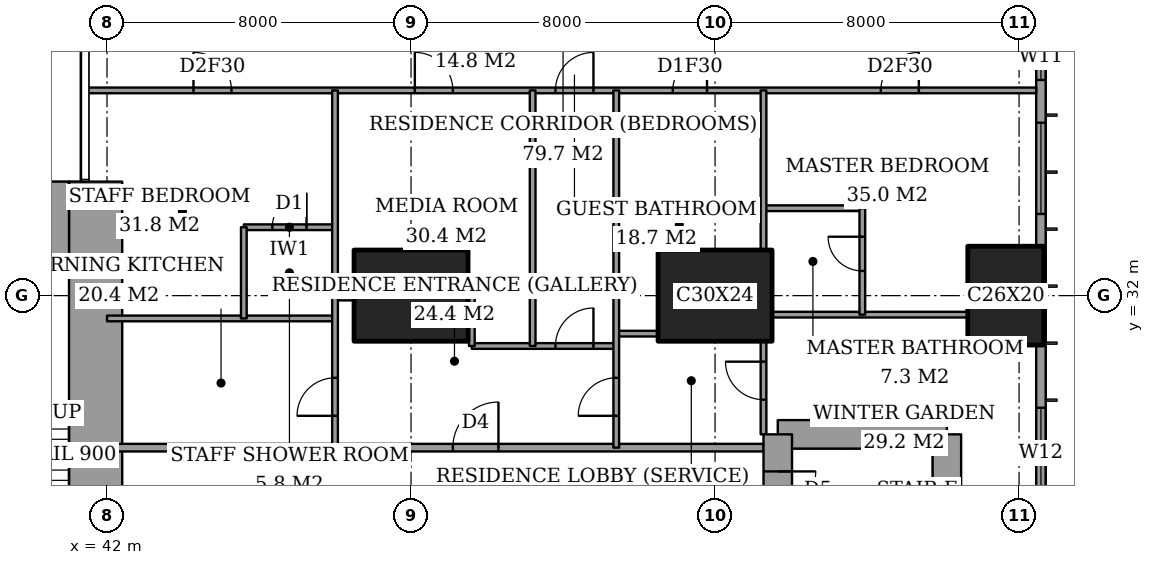
"""IFC4 building model, lengths in metres.
Left out: names, types, materials, properties, quantities, classifications, styles, units other than length and angle.
Written with IfcOpenShell. Run it as: python <this file> out.ifc"""

import sys

from ifc_helpers import new_model, si_unit, direction, frame, frame_2d, origin, origin_2d, place, context, subcontext, project, spatial, rectangle, extrude, element, fill, save


model = new_model("IFC4")
c1 = context("Model", 3, precision=1e-05, world=origin(), true_north=direction((0.0, 1.0)))
c2 = subcontext(c1, "Body", "Model", "MODEL_VIEW")
j1 = project(units=[si_unit("LENGTHUNIT", "METRE"), si_unit("PLANEANGLEUNIT", "RADIAN")], contexts=[c1])
p1 = place(None, origin())
s1 = spatial("IfcSite", under=j1, at=p1, CompositionType="ELEMENT")
p2 = place(p1, origin())
s2 = spatial("IfcBuilding", under=s1, at=p2, CompositionType="ELEMENT")
p3 = place(p2, frame((0.0, 0.0, 168.2)))
s3 = spatial("IfcBuildingStorey", under=s2, at=p3, CompositionType="ELEMENT", Elevation=168.2)
for number, where, z_axis, x_axis in (
    (1, (50.0, 32.0, 0.0), (0.0, 0.0, 1.0), (1.0, 0.0, 0.0)),
    (2, (58.0, 32.0, 0.0), (0.0, 0.0, 1.0), (1.0, 0.0, 0.0)),
):
    element("IfcColumn", number, at=place(p3, frame(where, z_axis=z_axis, x_axis=x_axis)), inside=s3, PredefinedType="COLUMN", context=c2, shape_type="SweptSolid", body=[
        extrude(rectangle(XDim=3.0, YDim=2.4, at=origin_2d()), origin(), (0.0, 0.0, 1.0), 3.6),
    ])
p4 = place(p3, frame((65.65, 32.0, 0.0), z_axis=(0.0, 0.0, 1.0), x_axis=(0.0, 1.0, 0.0)))
e3 = element("IfcColumn", 3, at=p4, inside=s3, PredefinedType="COLUMN", context=c2, shape_type="SweptSolid", body=[
    extrude(rectangle(XDim=2.6, YDim=2.0, at=origin_2d()), origin(), (0.0, 0.0, 1.0), 3.6),
])
p5 = place(p3, frame((37.85, 34.0, 0.0), z_axis=(0.0, 0.0, 1.0), x_axis=(1.0, 0.0, 0.0)))
e4 = element("IfcWall", 4, at=p5, inside=s3, PredefinedType="SHEAR", context=c2, shape_type="SweptSolid", body=[
    extrude(rectangle(XDim=3.15, YDim=2.0, at=frame_2d((1.575, 0.0))), origin(), (0.0, 0.0, 1.0), 3.6),
])
p6 = place(p3, frame((41.7, 24.85, 0.0), z_axis=(0.0, 0.0, 1.0), x_axis=(0.0, 1.0, 0.0)))
e5 = element("IfcWall", 5, at=p6, inside=s3, PredefinedType="SHEAR", context=c2, shape_type="SweptSolid", body=[
    extrude(rectangle(XDim=10.15, YDim=1.4, at=frame_2d((5.075, 0.0))), origin(), (0.0, 0.0, 1.0), 3.6),
])
p7 = place(p3, frame((64.1, 19.65, 0.0), z_axis=(0.0, 0.0, 1.0), x_axis=(0.0, 1.0, 0.0)))
e6 = element("IfcWall", 6, at=p7, inside=s3, PredefinedType="SHEAR", context=c2, shape_type="SweptSolid", body=[
    extrude(rectangle(XDim=8.7, YDim=0.75, at=frame_2d((4.35, 0.0))), origin(), (0.0, 0.0, 1.0), 3.6),
])
p8 = place(p3, frame((64.1, 28.35, 0.0), z_axis=(0.0, 0.0, 1.0), x_axis=(-1.0, 0.0, 0.0)))
e7 = element("IfcWall", 7, at=p8, inside=s3, PredefinedType="SHEAR", context=c2, shape_type="SweptSolid", body=[
    extrude(rectangle(XDim=4.45, YDim=0.75, at=frame_2d((2.225, 0.0))), origin(), (0.0, 0.0, 1.0), 3.6),
])
p9 = place(p3, frame((59.65, 28.35, 0.0), z_axis=(0.0, 0.0, 1.0), x_axis=(0.0, -1.0, 0.0)))
e8 = element("IfcWall", 8, at=p9, inside=s3, PredefinedType="SHEAR", context=c2, shape_type="SweptSolid", body=[
    extrude(rectangle(XDim=8.7, YDim=0.75, at=frame_2d((4.35, 0.0))), origin(), (0.0, 0.0, 1.0), 3.6),
])
p10 = place(p9, frame((0.975, 0.0, 0.0)))
e9 = element("IfcOpeningElement", 9, at=p10, cuts=e8, PredefinedType="OPENING", context=c2, shape_type="SweptSolid", body=[
    extrude(rectangle(XDim=1.0, YDim=2.1, at=frame_2d((0.5, 1.05))), frame((0.0, 0.385, 0.0), z_axis=(0.0, -1.0, 0.0), x_axis=(1.0, 0.0, 0.0)), (0.0, 0.0, 1.0), 0.77),
])
p11 = place(p3, frame((66.575, 3.175, 0.0), z_axis=(0.0, 0.0, 1.0), x_axis=(0.0, 1.0, 0.0)))
e10 = element("IfcWall", 10, at=p11, inside=s3, PredefinedType="SOLIDWALL", context=c2, shape_type="SweptSolid", body=[
    extrude(rectangle(XDim=41.65, YDim=0.25, at=frame_2d((20.825, 0.0))), origin(), (0.0, 0.0, 1.0), 3.6),
])
p12 = place(p11, frame((0.775, 0.0, 0.4)))
e11 = element("IfcOpeningElement", 11, at=p12, cuts=e10, PredefinedType="OPENING", context=c2, shape_type="SweptSolid", body=[
    extrude(rectangle(XDim=2.4, YDim=2.2, at=frame_2d((1.2, 1.1))), frame((0.0, 0.135, 0.0), z_axis=(0.0, -1.0, 0.0), x_axis=(1.0, 0.0, 0.0)), (0.0, 0.0, 1.0), 0.27),
])
p13 = place(p11, frame((6.225, 0.0, 0.4)))
e12 = element("IfcOpeningElement", 12, at=p13, cuts=e10, PredefinedType="OPENING", context=c2, shape_type="SweptSolid", body=[
    extrude(rectangle(XDim=1.2, YDim=2.2, at=frame_2d((0.6, 1.1))), frame((0.0, 0.135, 0.0), z_axis=(0.0, -1.0, 0.0), x_axis=(1.0, 0.0, 0.0)), (0.0, 0.0, 1.0), 0.27),
])
p14 = place(p11, frame((8.475, 0.0, 0.4)))
e13 = element("IfcOpeningElement", 13, at=p14, cuts=e10, PredefinedType="OPENING", context=c2, shape_type="SweptSolid", body=[
    extrude(rectangle(XDim=2.4, YDim=2.2, at=frame_2d((1.2, 1.1))), frame((0.0, 0.135, 0.0), z_axis=(0.0, -1.0, 0.0), x_axis=(1.0, 0.0, 0.0)), (0.0, 0.0, 1.0), 0.27),
])
p15 = place(p11, frame((15.775, 0.0, 0.4)))
e14 = element("IfcOpeningElement", 14, at=p15, cuts=e10, PredefinedType="OPENING", context=c2, shape_type="SweptSolid", body=[
    extrude(rectangle(XDim=2.4, YDim=2.2, at=frame_2d((1.2, 1.1))), frame((0.0, 0.135, 0.0), z_axis=(0.0, -1.0, 0.0), x_axis=(1.0, 0.0, 0.0)), (0.0, 0.0, 1.0), 0.27),
])
p16 = place(p11, frame((23.475, 0.0, 0.4)))
e15 = element("IfcOpeningElement", 15, at=p16, cuts=e10, PredefinedType="OPENING", context=c2, shape_type="SweptSolid", body=[
    extrude(rectangle(XDim=2.4, YDim=2.2, at=frame_2d((1.2, 1.1))), frame((0.0, 0.135, 0.0), z_axis=(0.0, -1.0, 0.0), x_axis=(1.0, 0.0, 0.0)), (0.0, 0.0, 1.0), 0.27),
])
p17 = place(p11, frame((30.975, 0.0, 0.4)))
e16 = element("IfcOpeningElement", 16, at=p17, cuts=e10, PredefinedType="OPENING", context=c2, shape_type="SweptSolid", body=[
    extrude(rectangle(XDim=2.4, YDim=2.2, at=frame_2d((1.2, 1.1))), frame((0.0, 0.135, 0.0), z_axis=(0.0, -1.0, 0.0), x_axis=(1.0, 0.0, 0.0)), (0.0, 0.0, 1.0), 0.27),
])
p18 = place(p11, frame((34.5, 0.0, 0.4)))
e17 = element("IfcOpeningElement", 17, at=p18, cuts=e10, PredefinedType="OPENING", context=c2, shape_type="SweptSolid", body=[
    extrude(rectangle(XDim=1.2, YDim=2.2, at=frame_2d((0.6, 1.1))), frame((0.0, 0.135, 0.0), z_axis=(0.0, -1.0, 0.0), x_axis=(1.0, 0.0, 0.0)), (0.0, 0.0, 1.0), 0.27),
])
p19 = place(p11, frame((38.475, 0.0, 0.4)))
e18 = element("IfcOpeningElement", 18, at=p19, cuts=e10, PredefinedType="OPENING", context=c2, shape_type="SweptSolid", body=[
    extrude(rectangle(XDim=2.4, YDim=2.2, at=frame_2d((1.2, 1.1))), frame((0.0, 0.135, 0.0), z_axis=(0.0, -1.0, 0.0), x_axis=(1.0, 0.0, 0.0)), (0.0, 0.0, 1.0), 0.27),
])
p20 = place(p3, frame((42.0, 28.0, 0.0), z_axis=(0.0, 0.0, 1.0), x_axis=(1.0, 0.0, 0.0)))
e19 = element("IfcWall", 19, at=p20, inside=s3, PredefinedType="PARTITIONING", context=c2, shape_type="SweptSolid", body=[
    extrude(rectangle(XDim=17.275, YDim=0.2, at=frame_2d((8.637, 0.0))), origin(), (0.0, 0.0, 1.0), 3.25),
])
p21 = place(p20, frame((9.1, 0.0, 0.0)))
e20 = element("IfcOpeningElement", 20, at=p21, cuts=e19, PredefinedType="OPENING", context=c2, shape_type="SweptSolid", body=[
    extrude(rectangle(XDim=1.2, YDim=2.4, at=frame_2d((0.6, 1.2))), frame((0.0, 0.11, 0.0), z_axis=(0.0, -1.0, 0.0), x_axis=(1.0, 0.0, 0.0)), (0.0, 0.0, 1.0), 0.22),
])
p22 = place(p3, frame((51.6, 30.675, 0.0), z_axis=(0.0, 0.0, 1.0), x_axis=(1.0, 0.0, 0.0)))
e21 = element("IfcWall", 21, at=p22, inside=s3, PredefinedType="PARTITIONING", context=c2, shape_type="SweptSolid", body=[
    extrude(rectangle(XDim=3.8, YDim=0.15, at=frame_2d((1.9, 0.0))), origin(), (0.0, 0.0, 1.0), 3.25),
])
p23 = place(p22, frame((2.2, 0.0, 0.0)))
e22 = element("IfcOpeningElement", 22, at=p23, cuts=e21, PredefinedType="OPENING", context=c2, shape_type="SweptSolid", body=[
    extrude(rectangle(XDim=1.0, YDim=2.1, at=frame_2d((0.5, 1.05))), frame((0.0, 0.085, 0.0), z_axis=(0.0, -1.0, 0.0), x_axis=(1.0, 0.0, 0.0)), (0.0, 0.0, 1.0), 0.17),
])
p24 = place(p3, frame((55.4, 31.0, 0.0), z_axis=(0.0, 0.0, 1.0), x_axis=(1.0, 0.0, 0.0)))
e23 = element("IfcWall", 23, at=p24, inside=s3, PredefinedType="PARTITIONING", context=c2, shape_type="SweptSolid", body=[
    extrude(rectangle(XDim=1.1, YDim=0.15, at=frame_2d((0.55, 0.0))), origin(), (0.0, 0.0, 1.0), 3.25),
])
p25 = place(p3, frame((42.0, 31.4, 0.0), z_axis=(0.0, 0.0, 1.0), x_axis=(1.0, 0.0, 0.0)))
e24 = element("IfcWall", 24, at=p25, inside=s3, PredefinedType="PARTITIONING", context=c2, shape_type="SweptSolid", body=[
    extrude(rectangle(XDim=6.0, YDim=0.15, at=frame_2d((3.0, 0.0))), origin(), (0.0, 0.0, 1.0), 3.25),
])
p26 = place(p3, frame((59.5, 31.5, 0.0), z_axis=(0.0, 0.0, 1.0), x_axis=(1.0, 0.0, 0.0)))
e25 = element("IfcWall", 25, at=p26, inside=s3, PredefinedType="PARTITIONING", context=c2, shape_type="SweptSolid", body=[
    extrude(rectangle(XDim=5.15, YDim=0.15, at=frame_2d((2.575, 0.0))), origin(), (0.0, 0.0, 1.0), 3.25),
])
p27 = place(p3, frame((48.0, 31.95, 0.0), z_axis=(0.0, 0.0, 1.0), x_axis=(1.0, 0.0, 0.0)))
e26 = element("IfcWall", 26, at=p27, inside=s3, PredefinedType="PARTITIONING", context=c2, shape_type="SweptSolid", body=[
    extrude(rectangle(XDim=0.5, YDim=0.15, at=frame_2d((0.25, 0.0))), origin(), (0.0, 0.0, 1.0), 3.25),
])
p28 = place(p3, frame((45.6, 33.8, 0.0), z_axis=(0.0, 0.0, 1.0), x_axis=(1.0, 0.0, 0.0)))
e27 = element("IfcWall", 27, at=p28, inside=s3, PredefinedType="PARTITIONING", context=c2, shape_type="SweptSolid", body=[
    extrude(rectangle(XDim=2.4, YDim=0.15, at=frame_2d((1.2, 0.0))), origin(), (0.0, 0.0, 1.0), 3.25),
])
p29 = place(p28, frame((0.75, 0.0, 0.0)))
e28 = element("IfcOpeningElement", 28, at=p29, cuts=e27, PredefinedType="OPENING", context=c2, shape_type="SweptSolid", body=[
    extrude(rectangle(XDim=0.9, YDim=2.1, at=frame_2d((0.45, 1.05))), frame((0.0, 0.085, 0.0), z_axis=(0.0, -1.0, 0.0), x_axis=(1.0, 0.0, 0.0)), (0.0, 0.0, 1.0), 0.17),
])
p30 = place(p3, frame((59.275, 34.3, 0.0), z_axis=(0.0, 0.0, 1.0), x_axis=(1.0, 0.0, 0.0)))
e29 = element("IfcWall", 29, at=p30, inside=s3, PredefinedType="PARTITIONING", context=c2, shape_type="SweptSolid", body=[
    extrude(rectangle(XDim=2.6, YDim=0.15, at=frame_2d((1.3, 0.0))), origin(), (0.0, 0.0, 1.0), 3.25),
])
p31 = place(p3, frame((41.439, 37.4, 0.0), z_axis=(0.0, 0.0, 1.0), x_axis=(1.0, 0.0, 0.0)))
e30 = element("IfcWall", 30, at=p31, inside=s3, PredefinedType="PARTITIONING", context=c2, shape_type="SweptSolid", body=[
    extrude(rectangle(XDim=25.011, YDim=0.15, at=frame_2d((12.505, 0.0))), origin(), (0.0, 0.0, 1.0), 3.25),
])
p32 = place(p31, frame((12.361, 0.0, 0.0)))
e31 = element("IfcOpeningElement", 31, at=p32, cuts=e30, PredefinedType="OPENING", context=c2, shape_type="SweptSolid", body=[
    extrude(rectangle(XDim=1.0, YDim=2.1, at=frame_2d((0.5, 1.05))), frame((0.0, 0.085, 0.0), z_axis=(0.0, -1.0, 0.0), x_axis=(1.0, 0.0, 0.0)), (0.0, 0.0, 1.0), 0.17),
])
p33 = place(p31, frame((20.924, 0.0, 0.0)))
e32 = element("IfcOpeningElement", 32, at=p33, cuts=e30, PredefinedType="OPENING", context=c2, shape_type="SweptSolid", body=[
    extrude(rectangle(XDim=1.0, YDim=2.1, at=frame_2d((0.5, 1.05))), frame((0.0, 0.085, 0.0), z_axis=(0.0, -1.0, 0.0), x_axis=(1.0, 0.0, 0.0)), (0.0, 0.0, 1.0), 0.17),
])
p34 = place(p31, frame((15.448, 0.0, 0.0)))
e33 = element("IfcOpeningElement", 33, at=p34, cuts=e30, PredefinedType="OPENING", context=c2, shape_type="SweptSolid", body=[
    extrude(rectangle(XDim=0.9, YDim=2.1, at=frame_2d((0.45, 1.05))), frame((0.0, 0.085, 0.0), z_axis=(0.0, -1.0, 0.0), x_axis=(1.0, 0.0, 0.0)), (0.0, 0.0, 1.0), 0.17),
])
p35 = place(p31, frame((8.661, 0.0, 0.0)))
e34 = element("IfcOpeningElement", 34, at=p35, cuts=e30, PredefinedType="OPENING", context=c2, shape_type="SweptSolid", body=[
    extrude(rectangle(XDim=1.0, YDim=2.1, at=frame_2d((0.5, 1.05))), frame((0.0, 0.085, 0.0), z_axis=(0.0, -1.0, 0.0), x_axis=(1.0, 0.0, 0.0)), (0.0, 0.0, 1.0), 0.17),
])
p36 = place(p31, frame((2.836, 0.0, 0.0)))
e35 = element("IfcOpeningElement", 35, at=p36, cuts=e30, PredefinedType="OPENING", context=c2, shape_type="SweptSolid", body=[
    extrude(rectangle(XDim=1.0, YDim=2.1, at=frame_2d((0.5, 1.05))), frame((0.0, 0.085, 0.0), z_axis=(0.0, -1.0, 0.0), x_axis=(1.0, 0.0, 0.0)), (0.0, 0.0, 1.0), 0.17),
])
p37 = place(p3, frame((45.6, 31.4, 0.0), z_axis=(0.0, 0.0, 1.0), x_axis=(0.0, 1.0, 0.0)))
e36 = element("IfcWall", 36, at=p37, inside=s3, PredefinedType="PARTITIONING", context=c2, shape_type="SweptSolid", body=[
    extrude(rectangle(XDim=2.4, YDim=0.15, at=frame_2d((1.2, 0.0))), origin(), (0.0, 0.0, 1.0), 3.25),
])
p38 = place(p3, frame((48.0, 28.0, 0.0), z_axis=(0.0, 0.0, 1.0), x_axis=(0.0, 1.0, 0.0)))
e37 = element("IfcWall", 37, at=p38, inside=s3, PredefinedType="PARTITIONING", context=c2, shape_type="SweptSolid", body=[
    extrude(rectangle(XDim=9.4, YDim=0.15, at=frame_2d((4.7, 0.0))), origin(), (0.0, 0.0, 1.0), 3.25),
])
p39 = place(p38, frame((0.837, 0.0, 0.0)))
e38 = element("IfcOpeningElement", 38, at=p39, cuts=e37, PredefinedType="OPENING", context=c2, shape_type="SweptSolid", body=[
    extrude(rectangle(XDim=1.0, YDim=2.1, at=frame_2d((0.5, 1.05))), frame((0.0, 0.085, 0.0), z_axis=(0.0, -1.0, 0.0), x_axis=(1.0, 0.0, 0.0)), (0.0, 0.0, 1.0), 0.17),
])
p40 = place(p3, frame((51.6, 30.675, 0.0), z_axis=(0.0, 0.0, 1.0), x_axis=(0.0, 1.0, 0.0)))
e39 = element("IfcWall", 39, at=p40, inside=s3, PredefinedType="PARTITIONING", context=c2, shape_type="SweptSolid", body=[
    extrude(rectangle(XDim=1.275, YDim=0.15, at=frame_2d((0.637, 0.0))), origin(), (0.0, 0.0, 1.0), 3.25),
])
p41 = place(p3, frame((53.2, 30.675, 0.0), z_axis=(0.0, 0.0, 1.0), x_axis=(0.0, 1.0, 0.0)))
e40 = element("IfcWall", 40, at=p41, inside=s3, PredefinedType="PARTITIONING", context=c2, shape_type="SweptSolid", body=[
    extrude(rectangle(XDim=6.725, YDim=0.15, at=frame_2d((3.362, 0.0))), origin(), (0.0, 0.0, 1.0), 3.25),
])
p42 = place(p3, frame((55.4, 28.0, 0.0), z_axis=(0.0, 0.0, 1.0), x_axis=(0.0, 1.0, 0.0)))
e41 = element("IfcWall", 41, at=p42, inside=s3, PredefinedType="PARTITIONING", context=c2, shape_type="SweptSolid", body=[
    extrude(rectangle(XDim=9.4, YDim=0.15, at=frame_2d((4.7, 0.0))), origin(), (0.0, 0.0, 1.0), 3.25),
])
p43 = place(p42, frame((0.837, 0.0, 0.0)))
e42 = element("IfcOpeningElement", 42, at=p43, cuts=e41, PredefinedType="OPENING", context=c2, shape_type="SweptSolid", body=[
    extrude(rectangle(XDim=1.0, YDim=2.1, at=frame_2d((0.5, 1.05))), frame((0.0, 0.085, 0.0), z_axis=(0.0, -1.0, 0.0), x_axis=(1.0, 0.0, 0.0)), (0.0, 0.0, 1.0), 0.17),
])
p44 = place(p3, frame((59.275, 28.35, 0.0), z_axis=(0.0, 0.0, 1.0), x_axis=(0.0, 1.0, 0.0)))
e43 = element("IfcWall", 43, at=p44, inside=s3, PredefinedType="PARTITIONING", context=c2, shape_type="SweptSolid", body=[
    extrude(rectangle(XDim=2.45, YDim=0.15, at=frame_2d((1.225, 0.0))), origin(), (0.0, 0.0, 1.0), 3.25),
])
p45 = place(p44, frame((0.913, 0.0, 0.0)))
e44 = element("IfcOpeningElement", 44, at=p45, cuts=e43, PredefinedType="OPENING", context=c2, shape_type="SweptSolid", body=[
    extrude(rectangle(XDim=1.0, YDim=2.1, at=frame_2d((0.5, 1.05))), frame((0.0, 0.085, 0.0), z_axis=(0.0, -1.0, 0.0), x_axis=(1.0, 0.0, 0.0)), (0.0, 0.0, 1.0), 0.17),
])
p46 = place(p3, frame((59.275, 33.2, 0.0), z_axis=(0.0, 0.0, 1.0), x_axis=(0.0, 1.0, 0.0)))
e45 = element("IfcWall", 45, at=p46, inside=s3, PredefinedType="PARTITIONING", context=c2, shape_type="SweptSolid", body=[
    extrude(rectangle(XDim=4.2, YDim=0.15, at=frame_2d((2.1, 0.0))), origin(), (0.0, 0.0, 1.0), 3.25),
])
p47 = place(p3, frame((61.875, 31.5, 0.0), z_axis=(0.0, 0.0, 1.0), x_axis=(0.0, 1.0, 0.0)))
e46 = element("IfcWall", 46, at=p47, inside=s3, PredefinedType="PARTITIONING", context=c2, shape_type="SweptSolid", body=[
    extrude(rectangle(XDim=2.8, YDim=0.15, at=frame_2d((1.4, 0.0))), origin(), (0.0, 0.0, 1.0), 3.25),
])
p48 = place(p47, frame((1.15, 0.0, 0.0)))
e47 = element("IfcOpeningElement", 47, at=p48, cuts=e46, PredefinedType="OPENING", context=c2, shape_type="SweptSolid", body=[
    extrude(rectangle(XDim=0.9, YDim=2.1, at=frame_2d((0.45, 1.05))), frame((0.0, 0.085, 0.0), z_axis=(0.0, -1.0, 0.0), x_axis=(1.0, 0.0, 0.0)), (0.0, 0.0, 1.0), 0.17),
])
p49 = place(p16, origin())
e48 = element("IfcWindow", 48, at=p49, inside=s3, PartitioningType="SINGLE_PANEL", PredefinedType="WINDOW", context=c2, shape_type="SweptSolid", body=[
    extrude(rectangle(XDim=2.4, YDim=2.2, at=frame_2d((1.2, 1.1))), frame((0.0, 0.03, 0.0), z_axis=(0.0, -1.0, 0.0), x_axis=(1.0, 0.0, 0.0)), (0.0, 0.0, 1.0), 0.06),
])
fill(e15, e48)
p50 = place(p17, origin())
e49 = element("IfcWindow", 49, at=p50, inside=s3, PartitioningType="SINGLE_PANEL", PredefinedType="WINDOW", context=c2, shape_type="SweptSolid", body=[
    extrude(rectangle(XDim=2.4, YDim=2.2, at=frame_2d((1.2, 1.1))), frame((0.0, 0.03, 0.0), z_axis=(0.0, -1.0, 0.0), x_axis=(1.0, 0.0, 0.0)), (0.0, 0.0, 1.0), 0.06),
])
fill(e16, e49)
p51 = place(p18, origin())
e50 = element("IfcWindow", 50, at=p51, inside=s3, PartitioningType="SINGLE_PANEL", PredefinedType="WINDOW", context=c2, shape_type="SweptSolid", body=[
    extrude(rectangle(XDim=1.2, YDim=2.2, at=frame_2d((0.6, 1.1))), frame((0.0, 0.03, 0.0), z_axis=(0.0, -1.0, 0.0), x_axis=(1.0, 0.0, 0.0)), (0.0, 0.0, 1.0), 0.06),
])
fill(e17, e50)
p52 = place(p32, origin())
e51 = element("IfcDoor", 51, at=p52, inside=s3, OperationType="SINGLE_SWING_LEFT", PredefinedType="DOOR", context=c2, shape_type="SweptSolid", body=[
    extrude(rectangle(XDim=1.0, YDim=2.1, at=frame_2d((0.5, 1.05))), frame((0.0, 0.025, 0.0), z_axis=(0.0, -1.0, 0.0), x_axis=(1.0, 0.0, 0.0)), (0.0, 0.0, 1.0), 0.05),
])
fill(e31, e51)
p53 = place(p48, origin())
e52 = element("IfcDoor", 52, at=p53, inside=s3, OperationType="SINGLE_SWING_LEFT", PredefinedType="DOOR", context=c2, shape_type="SweptSolid", body=[
    extrude(rectangle(XDim=0.9, YDim=2.1, at=frame_2d((0.45, 1.05))), frame((0.0, 0.025, 0.0), z_axis=(0.0, -1.0, 0.0), x_axis=(1.0, 0.0, 0.0)), (0.0, 0.0, 1.0), 0.05),
])
fill(e47, e52)
p54 = place(p33, origin())
e53 = element("IfcDoor", 53, at=p54, inside=s3, OperationType="SINGLE_SWING_LEFT", PredefinedType="DOOR", context=c2, shape_type="SweptSolid", body=[
    extrude(rectangle(XDim=1.0, YDim=2.1, at=frame_2d((0.5, 1.05))), frame((0.0, 0.025, 0.0), z_axis=(0.0, -1.0, 0.0), x_axis=(1.0, 0.0, 0.0)), (0.0, 0.0, 1.0), 0.05),
])
fill(e32, e53)
p55 = place(p45, origin())
e54 = element("IfcDoor", 54, at=p55, inside=s3, OperationType="SINGLE_SWING_LEFT", PredefinedType="DOOR", context=c2, shape_type="SweptSolid", body=[
    extrude(rectangle(XDim=1.0, YDim=2.1, at=frame_2d((0.5, 1.05))), frame((0.0, 0.025, 0.0), z_axis=(0.0, -1.0, 0.0), x_axis=(1.0, 0.0, 0.0)), (0.0, 0.0, 1.0), 0.05),
])
fill(e44, e54)
p56 = place(p34, origin())
e55 = element("IfcDoor", 55, at=p56, inside=s3, OperationType="SINGLE_SWING_LEFT", PredefinedType="DOOR", context=c2, shape_type="SweptSolid", body=[
    extrude(rectangle(XDim=0.9, YDim=2.1, at=frame_2d((0.45, 1.05))), frame((0.0, 0.025, 0.0), z_axis=(0.0, -1.0, 0.0), x_axis=(1.0, 0.0, 0.0)), (0.0, 0.0, 1.0), 0.05),
])
fill(e33, e55)
p57 = place(p43, origin())
e56 = element("IfcDoor", 56, at=p57, inside=s3, OperationType="SINGLE_SWING_RIGHT", PredefinedType="DOOR", context=c2, shape_type="SweptSolid", body=[
    extrude(rectangle(XDim=1.0, YDim=2.1, at=frame_2d((0.5, 1.05))), frame((0.0, 0.025, 0.0), z_axis=(0.0, -1.0, 0.0), x_axis=(1.0, 0.0, 0.0)), (0.0, 0.0, 1.0), 0.05),
])
fill(e42, e56)
p58 = place(p21, origin())
e57 = element("IfcDoor", 57, at=p58, inside=s3, OperationType="SINGLE_SWING_LEFT", PredefinedType="DOOR", context=c2, shape_type="SweptSolid", body=[
    extrude(rectangle(XDim=1.2, YDim=2.4, at=frame_2d((0.6, 1.2))), frame((0.0, 0.025, 0.0), z_axis=(0.0, -1.0, 0.0), x_axis=(1.0, 0.0, 0.0)), (0.0, 0.0, 1.0), 0.05),
])
fill(e20, e57)
p59 = place(p23, origin())
e58 = element("IfcDoor", 58, at=p59, inside=s3, OperationType="SINGLE_SWING_LEFT", PredefinedType="DOOR", context=c2, shape_type="SweptSolid", body=[
    extrude(rectangle(XDim=1.0, YDim=2.1, at=frame_2d((0.5, 1.05))), frame((0.0, 0.025, 0.0), z_axis=(0.0, -1.0, 0.0), x_axis=(1.0, 0.0, 0.0)), (0.0, 0.0, 1.0), 0.05),
])
fill(e22, e58)
p60 = place(p35, origin())
e59 = element("IfcDoor", 59, at=p60, inside=s3, OperationType="SINGLE_SWING_RIGHT", PredefinedType="DOOR", context=c2, shape_type="SweptSolid", body=[
    extrude(rectangle(XDim=1.0, YDim=2.1, at=frame_2d((0.5, 1.05))), frame((0.0, 0.025, 0.0), z_axis=(0.0, -1.0, 0.0), x_axis=(1.0, 0.0, 0.0)), (0.0, 0.0, 1.0), 0.05),
])
fill(e34, e59)
p61 = place(p29, origin())
e60 = element("IfcDoor", 60, at=p61, inside=s3, OperationType="SINGLE_SWING_LEFT", PredefinedType="DOOR", context=c2, shape_type="SweptSolid", body=[
    extrude(rectangle(XDim=0.9, YDim=2.1, at=frame_2d((0.45, 1.05))), frame((0.0, 0.025, 0.0), z_axis=(0.0, -1.0, 0.0), x_axis=(1.0, 0.0, 0.0)), (0.0, 0.0, 1.0), 0.05),
])
fill(e28, e60)
p62 = place(p36, origin())
e61 = element("IfcDoor", 61, at=p62, inside=s3, OperationType="SINGLE_SWING_RIGHT", PredefinedType="DOOR", context=c2, shape_type="SweptSolid", body=[
    extrude(rectangle(XDim=1.0, YDim=2.1, at=frame_2d((0.5, 1.05))), frame((0.0, 0.025, 0.0), z_axis=(0.0, -1.0, 0.0), x_axis=(1.0, 0.0, 0.0)), (0.0, 0.0, 1.0), 0.05),
])
fill(e35, e61)
p63 = place(p39, origin())
e62 = element("IfcDoor", 62, at=p63, inside=s3, OperationType="SINGLE_SWING_RIGHT", PredefinedType="DOOR", context=c2, shape_type="SweptSolid", body=[
    extrude(rectangle(XDim=1.0, YDim=2.1, at=frame_2d((0.5, 1.05))), frame((0.0, 0.025, 0.0), z_axis=(0.0, -1.0, 0.0), x_axis=(1.0, 0.0, 0.0)), (0.0, 0.0, 1.0), 0.05),
])
fill(e38, e62)
p64 = place(p10, origin())
e63 = element("IfcDoor", 63, at=p64, inside=s3, OperationType="SINGLE_SWING_RIGHT", PredefinedType="DOOR", context=c2, shape_type="SweptSolid", body=[
    extrude(rectangle(XDim=1.0, YDim=2.1, at=frame_2d((0.5, 1.05))), frame((0.0, 0.025, 0.0), z_axis=(0.0, -1.0, 0.0), x_axis=(1.0, 0.0, 0.0)), (0.0, 0.0, 1.0), 0.05),
])
fill(e9, e63)
save(model, sys.argv[1])
